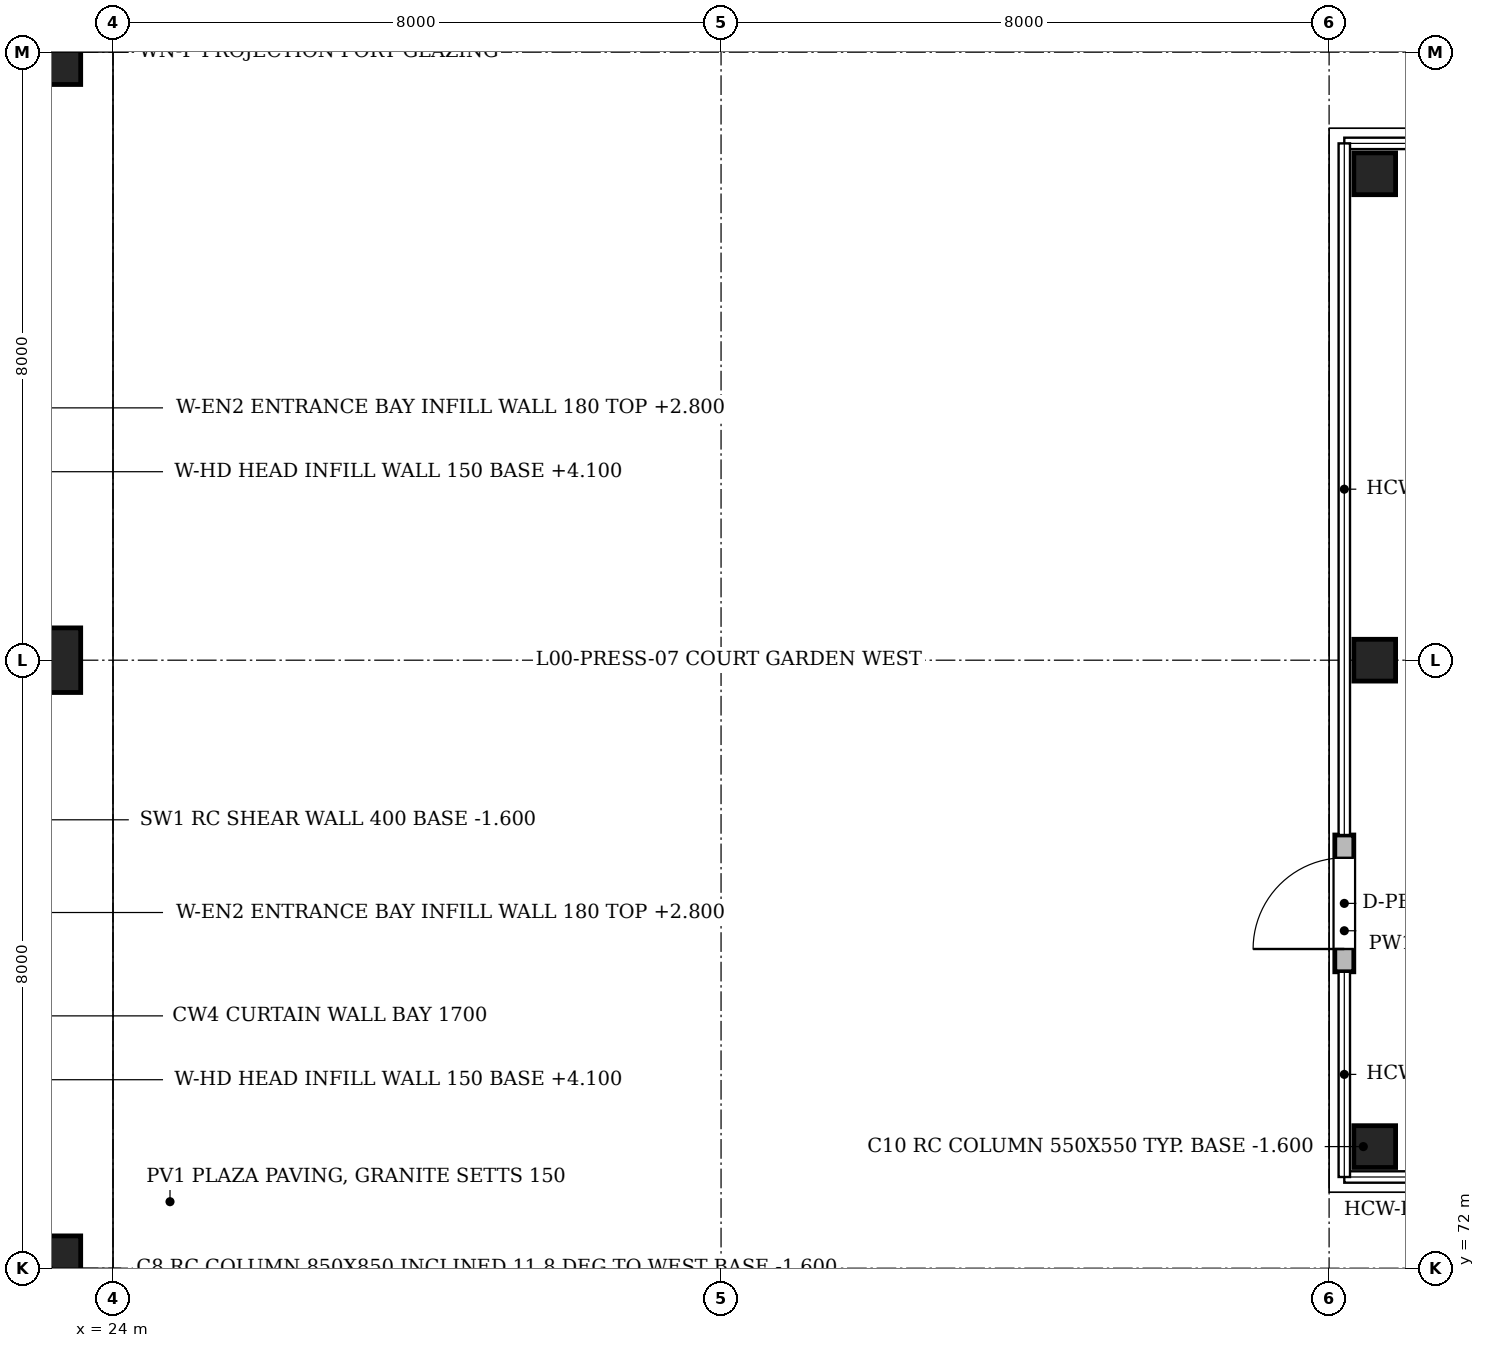
"""IFC4 building model, lengths in metres.
Left out: names, types, materials, properties, quantities, classifications, styles, units other than length and angle.
Written with IfcOpenShell. Run it as: python <this file> out.ifc"""

import sys

from ifc_helpers import new_model, si_unit, direction, frame, frame_2d, origin, origin_2d, place, context, subcontext, project, spatial, rectangle, extrude, element, fill, save


model = new_model("IFC4")
c1 = context("Model", 3, precision=1e-05, world=origin(), true_north=direction((0.0, 1.0)))
c2 = subcontext(c1, "Body", "Model", "MODEL_VIEW")
j1 = project(units=[si_unit("LENGTHUNIT", "METRE"), si_unit("PLANEANGLEUNIT", "RADIAN")], contexts=[c1])
p1 = place(None, origin())
s1 = spatial("IfcSite", under=j1, at=p1, CompositionType="ELEMENT")
p2 = place(p1, origin())
s2 = spatial("IfcBuilding", under=s1, at=p2, CompositionType="ELEMENT")
p3 = place(p2, origin())
s3 = spatial("IfcBuildingStorey", under=s2, at=p3, CompositionType="ELEMENT", Elevation=0.0)
for number, where, z_axis, x_axis in (
    (1, (23.733, 72.0, -1.6), (-0.204, 0.0, 0.979), (0.0, -1.0, 0.0)),
    (2, (23.733, 80.0, -1.6), (-0.204, 0.0, 0.979), (0.0, -1.0, 0.0)),
    (3, (23.733, 88.0, -1.6), (-0.204, 0.0, 0.979), (0.0, -1.0, 0.0)),
):
    element("IfcColumn", number, at=place(p3, frame(where, z_axis=z_axis, x_axis=x_axis)), inside=s3, PredefinedType="COLUMN", context=c2, shape_type="SweptSolid", body=[
        extrude(rectangle(XDim=0.85, YDim=0.85, at=origin_2d()), origin(), (0.0, 0.0, 1.0), 6.538),
    ])
for number, where, z_axis, x_axis in (
    (4, (40.6, 73.6, -1.6), (0.0, 0.0, 1.0), (1.0, 0.0, 0.0)),
    (5, (40.6, 80.0, -1.6), (0.0, 0.0, 1.0), (1.0, 0.0, 0.0)),
    (6, (40.6, 86.4, -1.6), (0.0, 0.0, 1.0), (1.0, 0.0, 0.0)),
):
    element("IfcColumn", number, at=place(p3, frame(where, z_axis=z_axis, x_axis=x_axis)), inside=s3, PredefinedType="COLUMN", context=c2, shape_type="SweptSolid", body=[
        extrude(rectangle(XDim=0.55, YDim=0.55, at=origin_2d()), origin(), (0.0, 0.0, 1.0), 6.4),
    ])
p4 = place(p3, frame((40.2, 75.9, 0.0), z_axis=(0.0, 0.0, 1.0), x_axis=(0.0, 1.0, 0.0)))
e7 = element("IfcWall", 7, at=p4, inside=s3, PredefinedType="SOLIDWALL", context=c2, shape_type="SweptSolid", body=[
    extrude(rectangle(XDim=1.8, YDim=0.25, at=frame_2d((0.9, 0.0))), origin(), (0.0, 0.0, 1.0), 4.8),
])
p5 = place(p4, frame((0.3, 0.0, 0.0)))
e8 = element("IfcOpeningElement", 8, at=p5, cuts=e7, PredefinedType="OPENING", context=c2, shape_type="SweptSolid", body=[
    extrude(rectangle(XDim=1.2, YDim=2.4, at=frame_2d((0.6, 1.2))), frame((0.0, 0.135, 0.0), z_axis=(0.0, -1.0, 0.0), x_axis=(1.0, 0.0, 0.0)), (0.0, 0.0, 1.0), 0.27),
])
p6 = place(p5, origin())
e9 = element("IfcDoor", 9, at=p6, inside=s3, OperationType="SINGLE_SWING_LEFT", PredefinedType="DOOR", context=c2, shape_type="SweptSolid", body=[
    extrude(rectangle(XDim=1.2, YDim=2.4, at=frame_2d((0.6, 1.2))), frame((0.0, 0.025, 0.0), z_axis=(0.0, -1.0, 0.0), x_axis=(1.0, 0.0, 0.0)), (0.0, 0.0, 1.0), 0.05),
])
fill(e8, e9)
save(model, sys.argv[1])
